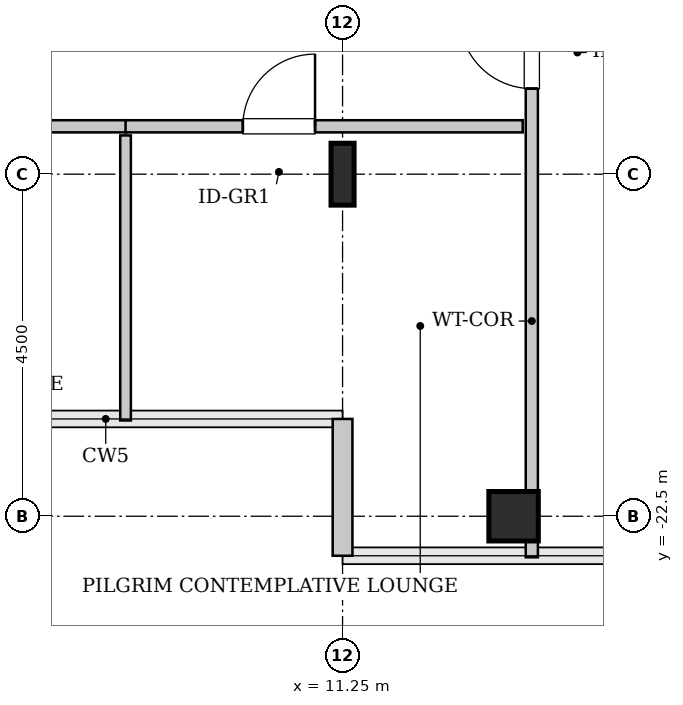
"""IFC4 building model, lengths in metres.
Left out: names, types, materials, properties, quantities, classifications, styles, units other than length and angle.
Written with IfcOpenShell. Run it as: python <this file> out.ifc"""

import sys

from ifc_helpers import new_model, si_unit, direction, frame, frame_2d, origin, origin_2d, place, context, subcontext, project, spatial, rectangle, hollow_rectangle, i_section, extrude, source, transform, mapped, element, fill, save


model = new_model("IFC4")
c1 = context("Model", 3, precision=1e-05, world=origin(), true_north=direction((0.0, 1.0)))
c2 = subcontext(c1, "Body", "Model", "MODEL_VIEW")
j1 = project(units=[si_unit("LENGTHUNIT", "METRE"), si_unit("PLANEANGLEUNIT", "RADIAN")], contexts=[c1])
p1 = place(None, origin())
s1 = spatial("IfcSite", under=j1, at=p1, CompositionType="ELEMENT")
p2 = place(p1, origin())
s2 = spatial("IfcBuilding", under=s1, at=p2, CompositionType="ELEMENT")
p3 = place(p2, frame((0.0, 0.0, 233.2)))
s3 = spatial("IfcBuildingStorey", under=s2, at=p3, CompositionType="ELEMENT", Elevation=233.2)
m1 = source(origin(), c2, "Body", "SweptSolid", [
    extrude(i_section(OverallWidth=0.303, OverallDepth=0.814, WebThickness=0.021, FlangeThickness=0.04, FilletRadius=0.03, at=origin_2d()), origin(), (0.0, 0.0, 1.0), 3.8),
])
p4 = place(p3, frame((11.25, -18.0, 0.0), z_axis=(0.0, 0.0, 1.0), x_axis=(1.0, 0.0, 0.0)))
e1 = element("IfcColumn", 1, at=p4, inside=s3, PredefinedType="COLUMN", context=c2, shape_type="MappedRepresentation", body=[
    mapped(m1, transform((0.0, 0.0, 0.0), x_axis=(1.0, 0.0, 0.0), y_axis=(0.0, 1.0, 0.0), z_axis=(0.0, 0.0, 1.0), scale=1.0)),
])
m2 = source(origin(), c2, "Body", "SweptSolid", [
    extrude(hollow_rectangle(XDim=0.65, YDim=0.65, WallThickness=0.032, InnerFilletRadius=0.032, OuterFilletRadius=0.064, at=origin_2d()), origin(), (0.0, 0.0, 1.0), 3.8),
])
p5 = place(p3, frame((13.5, -22.5, 0.0), z_axis=(0.0, 0.0, 1.0), x_axis=(1.0, 0.0, 0.0)))
e2 = element("IfcColumn", 2, at=p5, inside=s3, PredefinedType="COLUMN", context=c2, shape_type="MappedRepresentation", body=[
    mapped(m2, transform((0.0, 0.0, 0.0), x_axis=(1.0, 0.0, 0.0), y_axis=(0.0, 1.0, 0.0), z_axis=(0.0, 0.0, 1.0), scale=1.0)),
])
m3 = source(origin(), c2, "Body", "SweptSolid", [
    extrude(rectangle(XDim=1.8, YDim=0.26, at=frame_2d((0.9, 0.0))), origin(), (0.0, 0.0, 1.0), 3.55),
])
p6 = place(p3, frame((11.25, -21.22, 0.0), z_axis=(0.0, 0.0, 1.0), x_axis=(0.0, -1.0, 0.0)))
e3 = element("IfcWall", 3, at=p6, inside=s3, PredefinedType="SOLIDWALL", context=c2, shape_type="MappedRepresentation", body=[
    mapped(m3, transform((0.0, 0.0, 0.0), x_axis=(1.0, 0.0, 0.0), y_axis=(0.0, 1.0, 0.0), z_axis=(0.0, 0.0, 1.0), scale=1.0)),
])
m4 = source(origin(), c2, "Body", "SweptSolid", [
    extrude(rectangle(XDim=7.653, YDim=0.16, at=frame_2d((3.826, 0.0))), origin(), (0.0, 0.0, 1.0), 3.535),
])
p7 = place(p3, frame((13.74, -23.04, 0.0), z_axis=(0.0, 0.0, 1.0), x_axis=(0.0, 1.0, 0.0)))
e4 = element("IfcWall", 4, at=p7, inside=s3, PredefinedType="PARTITIONING", context=c2, shape_type="MappedRepresentation", body=[
    mapped(m4, transform((0.0, 0.0, 0.0), x_axis=(1.0, 0.0, 0.0), y_axis=(0.0, 1.0, 0.0), z_axis=(0.0, 0.0, 1.0), scale=1.0)),
])
p8 = place(p7, frame((6.166, 0.0, 0.0)))
e5 = element("IfcOpeningElement", 5, at=p8, cuts=e4, PredefinedType="OPENING", context=c2, shape_type="SweptSolid", body=[
    extrude(rectangle(XDim=0.95, YDim=2.1, at=frame_2d((0.475, 1.05))), frame((0.0, 0.09, 0.0), z_axis=(0.0, -1.0, 0.0), x_axis=(1.0, 0.0, 0.0)), (0.0, 0.0, 1.0), 0.18),
])
m5 = source(origin(), c2, "Body", "SweptSolid", [
    extrude(rectangle(XDim=6.21, YDim=0.16, at=frame_2d((3.105, 0.0))), origin(), (0.0, 0.0, 1.0), 3.535),
])
p9 = place(p3, frame((2.195, -17.37, 0.0), z_axis=(0.0, 0.0, 1.0), x_axis=(1.0, 0.0, 0.0)))
e6 = element("IfcWall", 6, at=p9, inside=s3, PredefinedType="PARTITIONING", context=c2, shape_type="MappedRepresentation", body=[
    mapped(m5, transform((0.0, 0.0, 0.0), x_axis=(1.0, 0.0, 0.0), y_axis=(0.0, 1.0, 0.0), z_axis=(0.0, 0.0, 1.0), scale=1.0)),
])
p10 = place(p9, frame((2.63, 0.0, 0.0)))
e7 = element("IfcOpeningElement", 7, at=p10, cuts=e6, PredefinedType="OPENING", context=c2, shape_type="SweptSolid", body=[
    extrude(rectangle(XDim=0.95, YDim=2.1, at=frame_2d((0.475, 1.05))), frame((0.0, 0.09, 0.0), z_axis=(0.0, -1.0, 0.0), x_axis=(1.0, 0.0, 0.0)), (0.0, 0.0, 1.0), 0.18),
])
m6 = source(origin(), c2, "Body", "SweptSolid", [
    extrude(rectangle(XDim=3.75, YDim=0.14, at=frame_2d((1.875, 0.0))), origin(), (0.0, 0.0, 1.0), 3.535),
])
p11 = place(p3, frame((8.395, -21.24, 0.0), z_axis=(0.0, 0.0, 1.0), x_axis=(0.0, 1.0, 0.0)))
e8 = element("IfcWall", 8, at=p11, inside=s3, PredefinedType="PARTITIONING", context=c2, shape_type="MappedRepresentation", body=[
    mapped(m6, transform((0.0, 0.0, 0.0), x_axis=(1.0, 0.0, 0.0), y_axis=(0.0, 1.0, 0.0), z_axis=(0.0, 0.0, 1.0), scale=1.0)),
])
m7 = source(origin(), c2, "Body", "SweptSolid", [
    extrude(rectangle(XDim=5.225, YDim=0.16, at=frame_2d((2.613, 0.0))), origin(), (0.0, 0.0, 1.0), 3.535),
])
p12 = place(p3, frame((8.395, -17.37, 0.0), z_axis=(0.0, 0.0, 1.0), x_axis=(1.0, 0.0, 0.0)))
e9 = element("IfcWall", 9, at=p12, inside=s3, PredefinedType="PARTITIONING", context=c2, shape_type="MappedRepresentation", body=[
    mapped(m7, transform((0.0, 0.0, 0.0), x_axis=(1.0, 0.0, 0.0), y_axis=(0.0, 1.0, 0.0), z_axis=(0.0, 0.0, 1.0), scale=1.0)),
])
p13 = place(p12, frame((1.543, 0.0, 0.0)))
e10 = element("IfcOpeningElement", 10, at=p13, cuts=e9, PredefinedType="OPENING", context=c2, shape_type="SweptSolid", body=[
    extrude(rectangle(XDim=0.95, YDim=2.1, at=frame_2d((0.475, 1.05))), frame((0.0, 0.09, 0.0), z_axis=(0.0, -1.0, 0.0), x_axis=(1.0, 0.0, 0.0)), (0.0, 0.0, 1.0), 0.18),
])
m8 = source(origin(), c2, "Body", "SweptSolid", [
    extrude(rectangle(XDim=0.95, YDim=2.1, at=frame_2d((0.475, 1.05))), frame((0.0, 0.025, 0.0), z_axis=(0.0, -1.0, 0.0), x_axis=(1.0, 0.0, 0.0)), (0.0, 0.0, 1.0), 0.05),
])
p14 = place(p8, origin())
e11 = element("IfcDoor", 11, at=p14, inside=s3, OperationType="SINGLE_SWING_RIGHT", PredefinedType="DOOR", context=c2, shape_type="MappedRepresentation", body=[
    mapped(m8, transform((0.0, 0.0, 0.0), x_axis=(1.0, 0.0, 0.0), y_axis=(0.0, 1.0, 0.0), z_axis=(0.0, 0.0, 1.0), scale=1.0)),
])
fill(e5, e11)
p15 = place(p13, origin())
e12 = element("IfcDoor", 12, at=p15, inside=s3, OperationType="SINGLE_SWING_RIGHT", PredefinedType="DOOR", context=c2, shape_type="MappedRepresentation", body=[
    mapped(m8, transform((0.0, 0.0, 0.0), x_axis=(1.0, 0.0, 0.0), y_axis=(0.0, 1.0, 0.0), z_axis=(0.0, 0.0, 1.0), scale=1.0)),
])
fill(e10, e12)
save(model, sys.argv[1])
